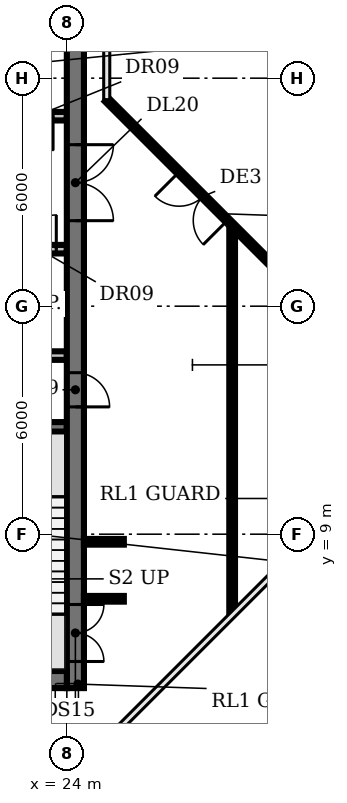
"""IFC4 building model, lengths in metres.
Left out: names, types, materials, properties, quantities, classifications, styles, units other than length and angle.
Written with IfcOpenShell. Run it as: python <this file> out.ifc"""

import sys

from ifc_helpers import new_model, si_unit, direction, frame, frame_2d, origin, place, context, subcontext, project, spatial, rectangle, extrude, element, fill, save


model = new_model("IFC4")
c1 = context("Model", 3, precision=1e-05, world=origin(), true_north=direction((0.0, 1.0)))
c2 = subcontext(c1, "Body", "Model", "MODEL_VIEW")
j1 = project(units=[si_unit("LENGTHUNIT", "METRE"), si_unit("PLANEANGLEUNIT", "RADIAN")], contexts=[c1])
p1 = place(None, origin())
s1 = spatial("IfcSite", under=j1, at=p1, CompositionType="ELEMENT")
p2 = place(p1, origin())
s2 = spatial("IfcBuilding", under=s1, at=p2, CompositionType="ELEMENT")
p3 = place(p2, frame((0.0, 0.0, 255.8)))
s3 = spatial("IfcBuildingStorey", under=s2, at=p3, CompositionType="ELEMENT", Elevation=255.8)
p4 = place(p3, frame((31.05, 14.435, 0.0), z_axis=(0.0, 0.0, 1.0), x_axis=(-0.707106781187, 0.707106781187, 0.0)))
e1 = element("IfcWall", 1, at=p4, inside=s3, PredefinedType="SOLIDWALL", context=c2, shape_type="SweptSolid", body=[
    extrude(rectangle(XDim=8.485, YDim=0.14, at=frame_2d((4.243, 0.0))), origin(), (0.0, 0.0, 1.0), 8.05),
])
p5 = place(p4, frame((3.993, 0.0, 0.0)))
e2 = element("IfcOpeningElement", 2, at=p5, cuts=e1, PredefinedType="OPENING", context=c2, shape_type="SweptSolid", body=[
    extrude(rectangle(XDim=1.8, YDim=2.4, at=frame_2d((0.9, 1.2))), frame((0.0, 0.08, 0.0), z_axis=(0.0, -1.0, 0.0), x_axis=(1.0, 0.0, 0.0)), (0.0, 0.0, 1.0), 0.16),
])
p6 = place(p3, frame((20.85, 11.825, 0.0), z_axis=(0.0, 0.0, 1.0), x_axis=(1.0, 0.0, 0.0)))
e3 = element("IfcWall", 3, at=p6, inside=s3, PredefinedType="SHEAR", context=c2, shape_type="SweptSolid", body=[
    extrude(rectangle(XDim=3.15, YDim=0.25, at=frame_2d((1.575, 0.0))), origin(), (0.0, 0.0, 1.0), 8.05),
])
p7 = place(p3, frame((16.6, 13.7, 0.0), z_axis=(0.0, 0.0, 1.0), x_axis=(1.0, 0.0, 0.0)))
e4 = element("IfcWall", 4, at=p7, inside=s3, PredefinedType="PARTITIONING", context=c2, shape_type="SweptSolid", body=[
    extrude(rectangle(XDim=7.4, YDim=0.225, at=frame_2d((3.7, 0.0))), origin(), (0.0, 0.0, 1.0), 8.05),
])
p8 = place(p3, frame((9.4, 16.5, 0.0), z_axis=(0.0, 0.0, 1.0), x_axis=(1.0, 0.0, 0.0)))
e5 = element("IfcWall", 5, at=p8, inside=s3, PredefinedType="PARTITIONING", context=c2, shape_type="SweptSolid", body=[
    extrude(rectangle(XDim=14.6, YDim=0.225, at=frame_2d((7.3, 0.0))), origin(), (0.0, 0.0, 1.0), 8.05),
])
p9 = place(p8, frame((1.9, 0.0, 0.0)))
e6 = element("IfcOpeningElement", 6, at=p9, cuts=e5, PredefinedType="OPENING", context=c2, shape_type="SweptSolid", body=[
    extrude(rectangle(XDim=1.0, YDim=2.1, at=frame_2d((0.5, 1.05))), frame((0.0, 0.123, 0.0), z_axis=(0.0, -1.0, 0.0), x_axis=(1.0, 0.0, 0.0)), (0.0, 0.0, 1.0), 0.245),
])
p10 = place(p8, frame((7.475, 0.0, 0.0)))
e7 = element("IfcOpeningElement", 7, at=p10, cuts=e5, PredefinedType="OPENING", context=c2, shape_type="SweptSolid", body=[
    extrude(rectangle(XDim=1.0, YDim=2.1, at=frame_2d((0.5, 1.05))), frame((0.0, 0.123, 0.0), z_axis=(0.0, -1.0, 0.0), x_axis=(1.0, 0.0, 0.0)), (0.0, 0.0, 1.0), 0.245),
])
p11 = place(p8, frame((11.647, 0.0, 0.0)))
e8 = element("IfcOpeningElement", 8, at=p11, cuts=e5, PredefinedType="OPENING", context=c2, shape_type="SweptSolid", body=[
    extrude(rectangle(XDim=0.9, YDim=2.1, at=frame_2d((0.45, 1.05))), frame((0.0, 0.123, 0.0), z_axis=(0.0, -1.0, 0.0), x_axis=(1.0, 0.0, 0.0)), (0.0, 0.0, 1.0), 0.245),
])
p12 = place(p8, frame((13.423, 0.0, 0.0)))
e9 = element("IfcOpeningElement", 9, at=p12, cuts=e5, PredefinedType="OPENING", context=c2, shape_type="SweptSolid", body=[
    extrude(rectangle(XDim=0.9, YDim=2.1, at=frame_2d((0.45, 1.05))), frame((0.0, 0.123, 0.0), z_axis=(0.0, -1.0, 0.0), x_axis=(1.0, 0.0, 0.0)), (0.0, 0.0, 1.0), 0.245),
])
p13 = place(p3, frame((24.0, 20.0, 0.0), z_axis=(0.0, 0.0, 1.0), x_axis=(-1.0, 0.0, 0.0)))
e10 = element("IfcWall", 10, at=p13, inside=s3, PredefinedType="PARTITIONING", context=c2, shape_type="SweptSolid", body=[
    extrude(rectangle(XDim=14.6, YDim=0.225, at=frame_2d((7.3, 0.0))), origin(), (0.0, 0.0, 1.0), 8.05),
])
p14 = place(p13, frame((12.75, 0.0, 0.0)))
e11 = element("IfcOpeningElement", 11, at=p14, cuts=e10, PredefinedType="OPENING", context=c2, shape_type="SweptSolid", body=[
    extrude(rectangle(XDim=1.1, YDim=2.1, at=frame_2d((0.55, 1.05))), frame((0.0, 0.123, 0.0), z_axis=(0.0, -1.0, 0.0), x_axis=(1.0, 0.0, 0.0)), (0.0, 0.0, 1.0), 0.245),
])
p15 = place(p13, frame((9.95, 0.0, 0.0)))
e12 = element("IfcOpeningElement", 12, at=p15, cuts=e10, PredefinedType="OPENING", context=c2, shape_type="SweptSolid", body=[
    extrude(rectangle(XDim=1.1, YDim=2.1, at=frame_2d((0.55, 1.05))), frame((0.0, 0.123, 0.0), z_axis=(0.0, -1.0, 0.0), x_axis=(1.0, 0.0, 0.0)), (0.0, 0.0, 1.0), 0.245),
])
p16 = place(p13, frame((7.15, 0.0, 0.0)))
e13 = element("IfcOpeningElement", 13, at=p16, cuts=e10, PredefinedType="OPENING", context=c2, shape_type="SweptSolid", body=[
    extrude(rectangle(XDim=1.1, YDim=2.1, at=frame_2d((0.55, 1.05))), frame((0.0, 0.123, 0.0), z_axis=(0.0, -1.0, 0.0), x_axis=(1.0, 0.0, 0.0)), (0.0, 0.0, 1.0), 0.245),
])
p17 = place(p13, frame((4.35, 0.0, 0.0)))
e14 = element("IfcOpeningElement", 14, at=p17, cuts=e10, PredefinedType="OPENING", context=c2, shape_type="SweptSolid", body=[
    extrude(rectangle(XDim=1.1, YDim=2.1, at=frame_2d((0.55, 1.05))), frame((0.0, 0.123, 0.0), z_axis=(0.0, -1.0, 0.0), x_axis=(1.0, 0.0, 0.0)), (0.0, 0.0, 1.0), 0.245),
])
p18 = place(p13, frame((2.137, 0.0, 0.0)))
e15 = element("IfcOpeningElement", 15, at=p18, cuts=e10, PredefinedType="OPENING", context=c2, shape_type="SweptSolid", body=[
    extrude(rectangle(XDim=0.9, YDim=2.1, at=frame_2d((0.45, 1.05))), frame((0.0, 0.123, 0.0), z_axis=(0.0, -1.0, 0.0), x_axis=(1.0, 0.0, 0.0)), (0.0, 0.0, 1.0), 0.245),
])
p19 = place(p13, frame((0.363, 0.0, 0.0)))
e16 = element("IfcOpeningElement", 16, at=p19, cuts=e10, PredefinedType="OPENING", context=c2, shape_type="SweptSolid", body=[
    extrude(rectangle(XDim=0.9, YDim=2.1, at=frame_2d((0.45, 1.05))), frame((0.0, 0.123, 0.0), z_axis=(0.0, -1.0, 0.0), x_axis=(1.0, 0.0, 0.0)), (0.0, 0.0, 1.0), 0.245),
])
p20 = place(p3, frame((24.225, 25.25, 0.0), z_axis=(0.0, 0.0, 1.0), x_axis=(0.0, -1.0, 0.0)))
e17 = element("IfcWall", 17, at=p20, inside=s3, PredefinedType="SHEAR", context=c2, shape_type="SweptSolid", body=[
    extrude(rectangle(XDim=20.3, YDim=0.45, at=frame_2d((10.15, 0.0))), origin(), (0.0, 0.0, 1.0), 8.05),
])
p21 = place(p20, frame((18.1, 0.0, 0.0)))
e18 = element("IfcOpeningElement", 18, at=p21, cuts=e17, PredefinedType="OPENING", context=c2, shape_type="SweptSolid", body=[
    extrude(rectangle(XDim=1.5, YDim=2.1, at=frame_2d((0.75, 1.05))), frame((0.0, 0.235, 0.0), z_axis=(0.0, -1.0, 0.0), x_axis=(1.0, 0.0, 0.0)), (0.0, 0.0, 1.0), 0.47),
])
p22 = place(p20, frame((12.0, 0.0, 0.0)))
e19 = element("IfcOpeningElement", 19, at=p22, cuts=e17, PredefinedType="OPENING", context=c2, shape_type="SweptSolid", body=[
    extrude(rectangle(XDim=0.9, YDim=2.1, at=frame_2d((0.45, 1.05))), frame((0.0, 0.235, 0.0), z_axis=(0.0, -1.0, 0.0), x_axis=(1.0, 0.0, 0.0)), (0.0, 0.0, 1.0), 0.47),
])
p23 = place(p20, frame((6.0, 0.0, 0.0)))
e20 = element("IfcOpeningElement", 20, at=p23, cuts=e17, PredefinedType="OPENING", context=c2, shape_type="SweptSolid", body=[
    extrude(rectangle(XDim=2.0, YDim=2.1, at=frame_2d((1.0, 1.05))), frame((0.0, 0.235, 0.0), z_axis=(0.0, -1.0, 0.0), x_axis=(1.0, 0.0, 0.0)), (0.0, 0.0, 1.0), 0.47),
])
p24 = place(p3, frame((24.0, 5.175, 0.0), z_axis=(0.0, 0.0, 1.0), x_axis=(-1.0, 0.0, 0.0)))
e21 = element("IfcWall", 21, at=p24, inside=s3, PredefinedType="SHEAR", context=c2, shape_type="SweptSolid", body=[
    extrude(rectangle(XDim=18.0, YDim=0.45, at=frame_2d((9.0, 0.0))), origin(), (0.0, 0.0, 1.0), 8.05),
])
p25 = place(p24, frame((13.0, 0.0, 0.0)))
e22 = element("IfcOpeningElement", 22, at=p25, cuts=e21, PredefinedType="OPENING", context=c2, shape_type="SweptSolid", body=[
    extrude(rectangle(XDim=1.2, YDim=2.1, at=frame_2d((0.6, 1.05))), frame((0.0, 0.235, 0.0), z_axis=(0.0, -1.0, 0.0), x_axis=(1.0, 0.0, 0.0)), (0.0, 0.0, 1.0), 0.47),
])
p26 = place(p24, frame((4.05, 0.0, 0.0)))
e23 = element("IfcOpeningElement", 23, at=p26, cuts=e21, PredefinedType="OPENING", context=c2, shape_type="SweptSolid", body=[
    extrude(rectangle(XDim=1.0, YDim=2.1, at=frame_2d((0.5, 1.05))), frame((0.0, 0.235, 0.0), z_axis=(0.0, -1.0, 0.0), x_axis=(1.0, 0.0, 0.0)), (0.0, 0.0, 1.0), 0.47),
])
for number, where, z_axis, x_axis in (
    (24, (24.45, 7.3, 0.0), (0.0, 0.0, 1.0), (1.0, 0.0, 0.0)),
    (25, (24.45, 8.8, 0.0), (0.0, 0.0, 1.0), (1.0, 0.0, 0.0)),
):
    element("IfcWall", number, at=place(p3, frame(where, z_axis=z_axis, x_axis=x_axis)), inside=s3, PredefinedType="PARTITIONING", context=c2, shape_type="SweptSolid", body=[
        extrude(rectangle(XDim=1.05, YDim=0.15, at=frame_2d((0.525, 0.0))), origin(), (0.0, 0.0, 1.0), 6.33),
    ])
p27 = place(p3, frame((28.35, 6.94, 0.0), z_axis=(0.0, 0.0, 1.0), x_axis=(0.0, 1.0, 0.0)))
e26 = element("IfcWall", 26, at=p27, inside=s3, PredefinedType="PARTITIONING", context=c2, shape_type="SweptSolid", body=[
    extrude(rectangle(XDim=10.12, YDim=0.15, at=frame_2d((5.06, 0.0))), origin(), (0.0, 0.0, 1.0), 6.33),
])
p28 = place(p5, origin())
e27 = element("IfcDoor", 27, at=p28, inside=s3, OperationType="DOUBLE_DOOR_DOUBLE_SWING", PredefinedType="DOOR", context=c2, shape_type="SweptSolid", body=[
    extrude(rectangle(XDim=1.8, YDim=2.4, at=frame_2d((0.9, 1.2))), frame((0.0, 0.025, 0.0), z_axis=(0.0, -1.0, 0.0), x_axis=(1.0, 0.0, 0.0)), (0.0, 0.0, 1.0), 0.05),
])
fill(e2, e27)
p29 = place(p12, origin())
e28 = element("IfcDoor", 28, at=p29, inside=s3, OperationType="SINGLE_SWING_RIGHT", PredefinedType="DOOR", context=c2, shape_type="SweptSolid", body=[
    extrude(rectangle(XDim=0.9, YDim=2.1, at=frame_2d((0.45, 1.05))), frame((0.0, 0.025, 0.0), z_axis=(0.0, -1.0, 0.0), x_axis=(1.0, 0.0, 0.0)), (0.0, 0.0, 1.0), 0.05),
])
fill(e9, e28)
p30 = place(p19, origin())
e29 = element("IfcDoor", 29, at=p30, inside=s3, OperationType="SINGLE_SWING_LEFT", PredefinedType="DOOR", context=c2, shape_type="SweptSolid", body=[
    extrude(rectangle(XDim=0.9, YDim=2.1, at=frame_2d((0.45, 1.05))), frame((0.0, 0.025, 0.0), z_axis=(0.0, -1.0, 0.0), x_axis=(1.0, 0.0, 0.0)), (0.0, 0.0, 1.0), 0.05),
])
fill(e16, e29)
p31 = place(p21, origin())
e30 = element("IfcDoor", 30, at=p31, inside=s3, OperationType="DOUBLE_DOOR_SINGLE_SWING", PredefinedType="DOOR", context=c2, shape_type="SweptSolid", body=[
    extrude(rectangle(XDim=1.5, YDim=2.1, at=frame_2d((0.75, 1.05))), frame((0.0, 0.025, 0.0), z_axis=(0.0, -1.0, 0.0), x_axis=(1.0, 0.0, 0.0)), (0.0, 0.0, 1.0), 0.05),
])
fill(e18, e30)
p32 = place(p22, origin())
e31 = element("IfcDoor", 31, at=p32, inside=s3, OperationType="SINGLE_SWING_RIGHT", PredefinedType="DOOR", context=c2, shape_type="SweptSolid", body=[
    extrude(rectangle(XDim=0.9, YDim=2.1, at=frame_2d((0.45, 1.05))), frame((0.0, 0.025, 0.0), z_axis=(0.0, -1.0, 0.0), x_axis=(1.0, 0.0, 0.0)), (0.0, 0.0, 1.0), 0.05),
])
fill(e19, e31)
p33 = place(p23, origin())
e32 = element("IfcDoor", 32, at=p33, inside=s3, OperationType="DOUBLE_DOOR_SINGLE_SWING", PredefinedType="DOOR", context=c2, shape_type="SweptSolid", body=[
    extrude(rectangle(XDim=2.0, YDim=2.1, at=frame_2d((1.0, 1.05))), frame((0.0, 0.025, 0.0), z_axis=(0.0, -1.0, 0.0), x_axis=(1.0, 0.0, 0.0)), (0.0, 0.0, 1.0), 0.05),
])
fill(e20, e32)
save(model, sys.argv[1])
